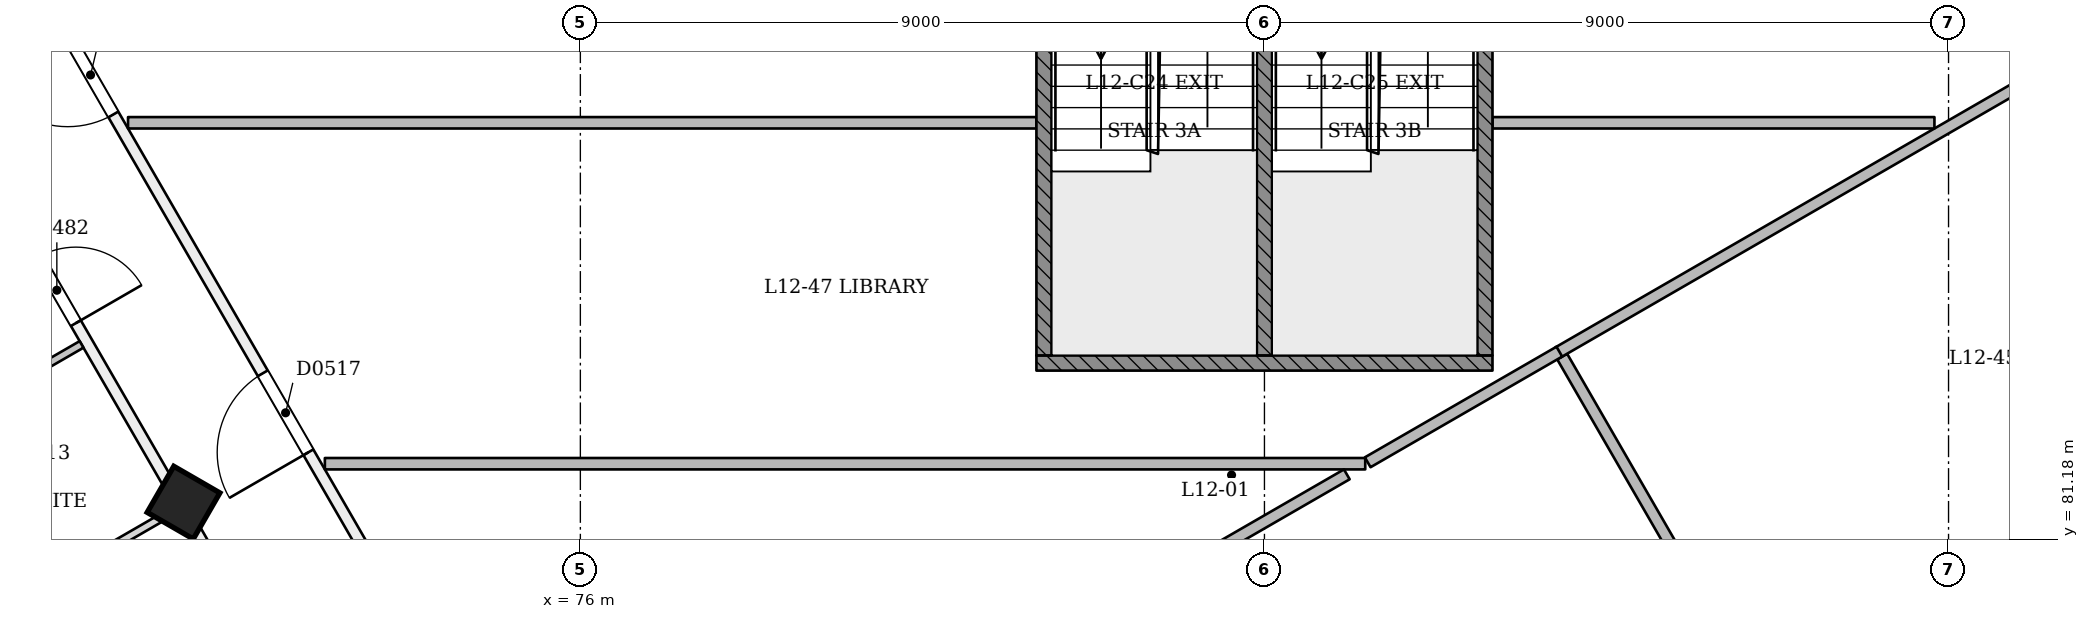
"""IFC4 building model, lengths in metres.
Left out: names, types, materials, properties, quantities, classifications, styles, units other than length and angle.
Written with IfcOpenShell. Run it as: python <this file> out.ifc"""

import sys

from ifc_helpers import new_model, si_unit, direction, frame, frame_2d, origin, origin_2d, place, context, subcontext, project, spatial, rectangle, extrude, element, fill, save


model = new_model("IFC4")
c1 = context("Model", 3, precision=1e-05, world=origin(), true_north=direction((0.0, 1.0)))
c2 = subcontext(c1, "Body", "Model", "MODEL_VIEW")
j1 = project(units=[si_unit("LENGTHUNIT", "METRE"), si_unit("PLANEANGLEUNIT", "RADIAN")], contexts=[c1])
p1 = place(None, origin())
s1 = spatial("IfcSite", under=j1, at=p1, CompositionType="ELEMENT")
p2 = place(p1, origin())
s2 = spatial("IfcBuilding", under=s1, at=p2, CompositionType="ELEMENT")
p3 = place(p2, frame((0.0, 0.0, 52.2)))
s3 = spatial("IfcBuildingStorey", under=s2, at=p3, CompositionType="ELEMENT", Elevation=52.2)
p4 = place(p3, frame((70.752, 81.616, -0.021), z_axis=(0.02215369191, 0.038413282303, 0.999016333038), x_axis=(-0.865362014197, -0.499673699336, 0.038402845936)))
e1 = element("IfcColumn", 1, at=p4, inside=s3, PredefinedType="COLUMN", context=c2, shape_type="SweptSolid", body=[
    extrude(rectangle(XDim=0.7, YDim=0.7, at=origin_2d()), origin(), (0.0, 0.0, 1.0), 3.604),
])
p5 = place(p3, frame((64.002, 93.308, 0.0), z_axis=(0.0, 0.0, 1.0), x_axis=(0.49999948646, -0.866025700277, 0.0)))
e2 = element("IfcWall", 2, at=p5, inside=s3, PredefinedType="PARTITIONING", context=c2, shape_type="SweptSolid", body=[
    extrude(rectangle(XDim=38.6, YDim=0.15, at=frame_2d((19.3, 0.0))), origin(), (0.0, 0.0, 1.0), 2.7),
])
p6 = place(p5, frame((0.605, 0.0, 0.0)))
e3 = element("IfcOpeningElement", 3, at=p6, cuts=e2, PredefinedType="OPENING", context=c2, shape_type="SweptSolid", body=[
    extrude(rectangle(XDim=1.0, YDim=2.1, at=frame_2d((0.5, 1.05))), frame((0.0, 0.085, 0.0), z_axis=(0.0, -1.0, 0.0), x_axis=(1.0, 0.0, 0.0)), (0.0, 0.0, 1.0), 0.171),
])
p7 = place(p5, frame((7.28, 0.0, 0.0)))
e4 = element("IfcOpeningElement", 4, at=p7, cuts=e2, PredefinedType="OPENING", context=c2, shape_type="SweptSolid", body=[
    extrude(rectangle(XDim=1.0, YDim=2.1, at=frame_2d((0.5, 1.05))), frame((0.0, 0.085, 0.0), z_axis=(0.0, -1.0, 0.0), x_axis=(1.0, 0.0, 0.0)), (0.0, 0.0, 1.0), 0.171),
])
p8 = place(p5, frame((9.72, 0.0, 0.0)))
e5 = element("IfcOpeningElement", 5, at=p8, cuts=e2, PredefinedType="OPENING", context=c2, shape_type="SweptSolid", body=[
    extrude(rectangle(XDim=1.0, YDim=2.1, at=frame_2d((0.5, 1.05))), frame((0.0, 0.085, 0.0), z_axis=(0.0, -1.0, 0.0), x_axis=(1.0, 0.0, 0.0)), (0.0, 0.0, 1.0), 0.171),
])
p9 = place(p5, frame((16.395, 0.0, 0.0)))
e6 = element("IfcOpeningElement", 6, at=p9, cuts=e2, PredefinedType="OPENING", context=c2, shape_type="SweptSolid", body=[
    extrude(rectangle(XDim=1.0, YDim=2.1, at=frame_2d((0.5, 1.05))), frame((0.0, 0.085, 0.0), z_axis=(0.0, -1.0, 0.0), x_axis=(1.0, 0.0, 0.0)), (0.0, 0.0, 1.0), 0.171),
])
p10 = place(p5, frame((18.72, 0.0, 0.0)))
e7 = element("IfcOpeningElement", 7, at=p10, cuts=e2, PredefinedType="OPENING", context=c2, shape_type="SweptSolid", body=[
    extrude(rectangle(XDim=1.0, YDim=2.1, at=frame_2d((0.5, 1.05))), frame((0.0, 0.085, 0.0), z_axis=(0.0, -1.0, 0.0), x_axis=(1.0, 0.0, 0.0)), (0.0, 0.0, 1.0), 0.171),
])
p11 = place(p5, frame((25.395, 0.0, 0.0)))
e8 = element("IfcOpeningElement", 8, at=p11, cuts=e2, PredefinedType="OPENING", context=c2, shape_type="SweptSolid", body=[
    extrude(rectangle(XDim=1.0, YDim=2.1, at=frame_2d((0.5, 1.05))), frame((0.0, 0.085, 0.0), z_axis=(0.0, -1.0, 0.0), x_axis=(1.0, 0.0, 0.0)), (0.0, 0.0, 1.0), 0.171),
])
p12 = place(p5, frame((27.605, 0.0, 0.0)))
e9 = element("IfcOpeningElement", 9, at=p12, cuts=e2, PredefinedType="OPENING", context=c2, shape_type="SweptSolid", body=[
    extrude(rectangle(XDim=1.0, YDim=2.1, at=frame_2d((0.5, 1.05))), frame((0.0, 0.085, 0.0), z_axis=(0.0, -1.0, 0.0), x_axis=(1.0, 0.0, 0.0)), (0.0, 0.0, 1.0), 0.171),
])
p13 = place(p5, frame((34.28, 0.0, 0.0)))
e10 = element("IfcOpeningElement", 10, at=p13, cuts=e2, PredefinedType="OPENING", context=c2, shape_type="SweptSolid", body=[
    extrude(rectangle(XDim=1.0, YDim=2.1, at=frame_2d((0.5, 1.05))), frame((0.0, 0.085, 0.0), z_axis=(0.0, -1.0, 0.0), x_axis=(1.0, 0.0, 0.0)), (0.0, 0.0, 1.0), 0.171),
])
p14 = place(p5, frame((37.324, 0.0, 0.0)))
e11 = element("IfcOpeningElement", 11, at=p14, cuts=e2, PredefinedType="OPENING", context=c2, shape_type="SweptSolid", body=[
    extrude(rectangle(XDim=1.0, YDim=2.1, at=frame_2d((0.5, 1.05))), frame((0.0, 0.085, 0.0), z_axis=(0.0, -1.0, 0.0), x_axis=(1.0, 0.0, 0.0)), (0.0, 0.0, 1.0), 0.171),
])
p15 = place(p3, frame((86.05, 58.757, 0.0), z_axis=(0.0, 0.0, 1.0), x_axis=(0.499999296855, 0.866025809745, 0.0)))
e12 = element("IfcWall", 12, at=p15, inside=s3, PredefinedType="PARTITIONING", context=c2, shape_type="SweptSolid", body=[
    extrude(rectangle(XDim=43.792, YDim=0.15, at=frame_2d((21.896, 0.0))), origin(), (0.0, 0.0, 1.0), 2.7),
])
p16 = place(p15, frame((3.598, 0.0, 0.0)))
e13 = element("IfcOpeningElement", 13, at=p16, cuts=e12, PredefinedType="OPENING", context=c2, shape_type="SweptSolid", body=[
    extrude(rectangle(XDim=1.2, YDim=2.1, at=frame_2d((0.6, 1.05))), frame((0.0, 0.085, 0.0), z_axis=(0.0, -1.0, 0.0), x_axis=(1.0, 0.0, 0.0)), (0.0, 0.0, 1.0), 0.171),
])
p17 = place(p15, frame((11.176, 0.0, 0.0)))
e14 = element("IfcOpeningElement", 14, at=p17, cuts=e12, PredefinedType="OPENING", context=c2, shape_type="SweptSolid", body=[
    extrude(rectangle(XDim=1.0, YDim=2.1, at=frame_2d((0.5, 1.05))), frame((0.0, 0.085, 0.0), z_axis=(0.0, -1.0, 0.0), x_axis=(1.0, 0.0, 0.0)), (0.0, 0.0, 1.0), 0.171),
])
p18 = place(p15, frame((13.616, 0.0, 0.0)))
e15 = element("IfcOpeningElement", 15, at=p18, cuts=e12, PredefinedType="OPENING", context=c2, shape_type="SweptSolid", body=[
    extrude(rectangle(XDim=1.0, YDim=2.1, at=frame_2d((0.5, 1.05))), frame((0.0, 0.085, 0.0), z_axis=(0.0, -1.0, 0.0), x_axis=(1.0, 0.0, 0.0)), (0.0, 0.0, 1.0), 0.171),
])
p19 = place(p15, frame((20.176, 0.0, 0.0)))
e16 = element("IfcOpeningElement", 16, at=p19, cuts=e12, PredefinedType="OPENING", context=c2, shape_type="SweptSolid", body=[
    extrude(rectangle(XDim=1.0, YDim=2.1, at=frame_2d((0.5, 1.05))), frame((0.0, 0.085, 0.0), z_axis=(0.0, -1.0, 0.0), x_axis=(1.0, 0.0, 0.0)), (0.0, 0.0, 1.0), 0.171),
])
p20 = place(p15, frame((22.616, 0.0, 0.0)))
e17 = element("IfcOpeningElement", 17, at=p20, cuts=e12, PredefinedType="OPENING", context=c2, shape_type="SweptSolid", body=[
    extrude(rectangle(XDim=1.0, YDim=2.1, at=frame_2d((0.5, 1.05))), frame((0.0, 0.085, 0.0), z_axis=(0.0, -1.0, 0.0), x_axis=(1.0, 0.0, 0.0)), (0.0, 0.0, 1.0), 0.171),
])
p21 = place(p15, frame((29.176, 0.0, 0.0)))
e18 = element("IfcOpeningElement", 18, at=p21, cuts=e12, PredefinedType="OPENING", context=c2, shape_type="SweptSolid", body=[
    extrude(rectangle(XDim=1.0, YDim=2.1, at=frame_2d((0.5, 1.05))), frame((0.0, 0.085, 0.0), z_axis=(0.0, -1.0, 0.0), x_axis=(1.0, 0.0, 0.0)), (0.0, 0.0, 1.0), 0.171),
])
p22 = place(p15, frame((31.616, 0.0, 0.0)))
e19 = element("IfcOpeningElement", 19, at=p22, cuts=e12, PredefinedType="OPENING", context=c2, shape_type="SweptSolid", body=[
    extrude(rectangle(XDim=1.0, YDim=2.1, at=frame_2d((0.5, 1.05))), frame((0.0, 0.085, 0.0), z_axis=(0.0, -1.0, 0.0), x_axis=(1.0, 0.0, 0.0)), (0.0, 0.0, 1.0), 0.171),
])
p23 = place(p15, frame((38.176, 0.0, 0.0)))
e20 = element("IfcOpeningElement", 20, at=p23, cuts=e12, PredefinedType="OPENING", context=c2, shape_type="SweptSolid", body=[
    extrude(rectangle(XDim=1.0, YDim=2.1, at=frame_2d((0.5, 1.05))), frame((0.0, 0.085, 0.0), z_axis=(0.0, -1.0, 0.0), x_axis=(1.0, 0.0, 0.0)), (0.0, 0.0, 1.0), 0.171),
])
p24 = place(p15, frame((41.344, 0.0, 0.0)))
e21 = element("IfcOpeningElement", 21, at=p24, cuts=e12, PredefinedType="OPENING", context=c2, shape_type="SweptSolid", body=[
    extrude(rectangle(XDim=1.0, YDim=2.1, at=frame_2d((0.5, 1.05))), frame((0.0, 0.085, 0.0), z_axis=(0.0, -1.0, 0.0), x_axis=(1.0, 0.0, 0.0)), (0.0, 0.0, 1.0), 0.171),
])
p25 = place(p3, frame((85.0, 60.54, 0.0), z_axis=(0.0, 0.0, 1.0), x_axis=(-0.500000084694, 0.866025354886, 0.0)))
e22 = element("IfcWall", 22, at=p25, inside=s3, PredefinedType="PARTITIONING", context=c2, shape_type="SweptSolid", body=[
    extrude(rectangle(XDim=34.711, YDim=0.15, at=frame_2d((17.355, 0.0))), origin(), (0.0, 0.0, 1.0), 3.1),
])
p26 = place(p25, frame((5.966, 0.0, 0.0)))
e23 = element("IfcOpeningElement", 23, at=p26, cuts=e22, PredefinedType="OPENING", context=c2, shape_type="SweptSolid", body=[
    extrude(rectangle(XDim=1.2, YDim=2.1, at=frame_2d((0.6, 1.05))), frame((0.0, 0.085, 0.0), z_axis=(0.0, -1.0, 0.0), x_axis=(1.0, 0.0, 0.0)), (0.0, 0.0, 1.0), 0.171),
])
p27 = place(p25, frame((11.813, 0.0, 0.0)))
e24 = element("IfcOpeningElement", 24, at=p27, cuts=e22, PredefinedType="OPENING", context=c2, shape_type="SweptSolid", body=[
    extrude(rectangle(XDim=1.2, YDim=2.1, at=frame_2d((0.6, 1.05))), frame((0.0, 0.085, 0.0), z_axis=(0.0, -1.0, 0.0), x_axis=(1.0, 0.0, 0.0)), (0.0, 0.0, 1.0), 0.171),
])
p28 = place(p25, frame((25.156, 0.0, 0.0)))
e25 = element("IfcOpeningElement", 25, at=p28, cuts=e22, PredefinedType="OPENING", context=c2, shape_type="SweptSolid", body=[
    extrude(rectangle(XDim=1.2, YDim=2.1, at=frame_2d((0.6, 1.05))), frame((0.0, 0.085, 0.0), z_axis=(0.0, -1.0, 0.0), x_axis=(1.0, 0.0, 0.0)), (0.0, 0.0, 1.0), 0.171),
])
p29 = place(p25, frame((30.288, 0.0, 0.0)))
e26 = element("IfcOpeningElement", 26, at=p29, cuts=e22, PredefinedType="OPENING", context=c2, shape_type="SweptSolid", body=[
    extrude(rectangle(XDim=1.2, YDim=2.1, at=frame_2d((0.6, 1.05))), frame((0.0, 0.085, 0.0), z_axis=(0.0, -1.0, 0.0), x_axis=(1.0, 0.0, 0.0)), (0.0, 0.0, 1.0), 0.171),
])
p30 = place(p25, frame((15.887, 0.0, 0.0)))
e27 = element("IfcOpeningElement", 27, at=p30, cuts=e22, PredefinedType="OPENING", context=c2, shape_type="SweptSolid", body=[
    extrude(rectangle(XDim=1.2, YDim=2.1, at=frame_2d((0.6, 1.05))), frame((0.0, 0.085, 0.0), z_axis=(0.0, -1.0, 0.0), x_axis=(1.0, 0.0, 0.0)), (0.0, 0.0, 1.0), 0.171),
])
p31 = place(p25, frame((19.777, 0.0, 0.0)))
e28 = element("IfcOpeningElement", 28, at=p31, cuts=e22, PredefinedType="OPENING", context=c2, shape_type="SweptSolid", body=[
    extrude(rectangle(XDim=1.2, YDim=2.1, at=frame_2d((0.6, 1.05))), frame((0.0, 0.085, 0.0), z_axis=(0.0, -1.0, 0.0), x_axis=(1.0, 0.0, 0.0)), (0.0, 0.0, 1.0), 0.171),
])
p32 = place(p3, frame((102.355, 90.6, 0.0), z_axis=(0.0, 0.0, 1.0), x_axis=(-0.500000924128, -0.866024870238, 0.0)))
e29 = element("IfcWall", 29, at=p32, inside=s3, PredefinedType="PARTITIONING", context=c2, shape_type="SweptSolid", body=[
    extrude(rectangle(XDim=34.581, YDim=0.15, at=frame_2d((17.291, 0.0))), origin(), (0.0, 0.0, 1.0), 3.1),
])
p33 = place(p32, frame((9.118, 0.0, 0.0)))
e30 = element("IfcOpeningElement", 30, at=p33, cuts=e29, PredefinedType="OPENING", context=c2, shape_type="SweptSolid", body=[
    extrude(rectangle(XDim=1.2, YDim=2.1, at=frame_2d((0.6, 1.05))), frame((0.0, 0.085, 0.0), z_axis=(0.0, -1.0, 0.0), x_axis=(1.0, 0.0, 0.0)), (0.0, 0.0, 1.0), 0.171),
])
p34 = place(p3, frame((66.991, 82.332, 0.0), z_axis=(0.0, 0.0, 1.0), x_axis=(0.866048868473, 0.499959355765, 0.0)))
e31 = element("IfcWall", 31, at=p34, inside=s3, PredefinedType="PARTITIONING", context=c2, shape_type="SweptSolid", body=[
    extrude(rectangle(XDim=2.825, YDim=0.1, at=frame_2d((1.413, 0.0))), origin(), (0.0, 0.0, 1.0), 3.1),
])
p35 = place(p34, frame((1.0, 0.0, 0.0)))
e32 = element("IfcOpeningElement", 32, at=p35, cuts=e31, PredefinedType="OPENING", context=c2, shape_type="SweptSolid", body=[
    extrude(rectangle(XDim=0.9, YDim=2.1, at=frame_2d((0.45, 1.05))), frame((0.0, 0.061, 0.0), z_axis=(0.0, -1.0, 0.0), x_axis=(1.0, 0.0, 0.0)), (0.0, 0.0, 1.0), 0.121),
])
p36 = place(p3, frame((68.224, 80.157, 0.0), z_axis=(0.0, 0.0, 1.0), x_axis=(0.866026948466, 0.499997324523, 0.0)))
e33 = element("IfcWall", 33, at=p36, inside=s3, PredefinedType="PARTITIONING", context=c2, shape_type="SweptSolid", body=[
    extrude(rectangle(XDim=2.845, YDim=0.1, at=frame_2d((1.422, 0.0))), origin(), (0.0, 0.0, 1.0), 2.7),
])
p37 = place(p3, frame((88.917, 83.584, 0.0), z_axis=(0.0, 0.0, 1.0), x_axis=(0.499986679841, -0.866033094045, 0.0)))
e34 = element("IfcWall", 34, at=p37, inside=s3, PredefinedType="PARTITIONING", context=c2, shape_type="SweptSolid", body=[
    extrude(rectangle(XDim=7.998, YDim=0.15, at=frame_2d((3.999, 0.0))), origin(), (0.0, 0.0, 1.0), 3.1),
])
p38 = place(p3, frame((100.676, 90.46, 0.0), z_axis=(0.0, 0.0, 1.0), x_axis=(-0.866019571687, -0.500010101354, 0.0)))
e35 = element("IfcWall", 35, at=p38, inside=s3, PredefinedType="PARTITIONING", context=c2, shape_type="SweptSolid", body=[
    extrude(rectangle(XDim=13.641, YDim=0.15, at=frame_2d((6.82, 0.0))), origin(), (0.0, 0.0, 1.0), 3.1),
])
p39 = place(p3, frame((82.0, 86.66, 0.0), z_axis=(0.0, 0.0, 1.0), x_axis=(-1.0, 0.0, 0.0)))
e36 = element("IfcWall", 36, at=p39, inside=s3, PredefinedType="PARTITIONING", context=c2, shape_type="SweptSolid", body=[
    extrude(rectangle(XDim=11.951, YDim=0.15, at=frame_2d((5.976, 0.0))), origin(), (0.0, 0.0, 1.0), 3.1),
])
p40 = place(p3, frame((86.358, 82.194, 0.0), z_axis=(0.0, 0.0, 1.0), x_axis=(0.86603616059, 0.499981368203, 0.0)))
e37 = element("IfcWall", 37, at=p40, inside=s3, PredefinedType="PARTITIONING", context=c2, shape_type="SweptSolid", body=[
    extrude(rectangle(XDim=2.911, YDim=0.15, at=frame_2d((1.456, 0.0))), origin(), (0.0, 0.0, 1.0), 3.1),
])
p41 = place(p3, frame((72.639, 82.175, 0.0), z_axis=(0.0, 0.0, 1.0), x_axis=(1.0, 0.0, 0.0)))
e38 = element("IfcWall", 38, at=p41, inside=s3, PredefinedType="PARTITIONING", context=c2, shape_type="SweptSolid", body=[
    extrude(rectangle(XDim=13.687, YDim=0.15, at=frame_2d((6.844, 0.0))), origin(), (0.0, 0.0, 1.0), 3.1),
])
p42 = place(p3, frame((93.814, 86.66, 0.0), z_axis=(0.0, 0.0, 1.0), x_axis=(-1.0, 0.0, 0.0)))
e39 = element("IfcWall", 39, at=p42, inside=s3, PredefinedType="PARTITIONING", context=c2, shape_type="SweptSolid", body=[
    extrude(rectangle(XDim=5.814, YDim=0.15, at=frame_2d((2.907, 0.0))), origin(), (0.0, 0.0, 1.0), 3.1),
])
p43 = place(p3, frame((86.083, 82.035, 0.0), z_axis=(0.0, 0.0, 1.0), x_axis=(-0.866028367734, -0.499994866253, 0.0)))
e40 = element("IfcWall", 40, at=p43, inside=s3, PredefinedType="PARTITIONING", context=c2, shape_type="SweptSolid", body=[
    extrude(rectangle(XDim=11.611, YDim=0.15, at=frame_2d((5.805, 0.0))), origin(), (0.0, 0.0, 1.0), 3.1),
])
p44 = place(p3, frame((82.0, 83.5, 0.0), z_axis=(0.0, 0.0, 1.0), x_axis=(1.0, 0.0, 0.0)))
e41 = element("IfcWall", 41, at=p44, inside=s3, PredefinedType="SOLIDWALL", context=c2, shape_type="SweptSolid", body=[
    extrude(rectangle(XDim=6.0, YDim=0.2, at=frame_2d((3.0, 0.0))), origin(), (0.0, 0.0, 1.0), 3.1),
])
for number, where, z_axis, x_axis in (
    (42, (82.1, 83.6, 0.0), (0.0, 0.0, 1.0), (0.0, 1.0, 0.0)),
    (43, (87.9, 83.6, 0.0), (0.0, 0.0, 1.0), (0.0, 1.0, 0.0)),
    (44, (85.0, 83.6, 0.0), (0.0, 0.0, 1.0), (0.0, 1.0, 0.0)),
):
    element("IfcWall", number, at=place(p3, frame(where, z_axis=z_axis, x_axis=x_axis)), inside=s3, PredefinedType="SOLIDWALL", context=c2, shape_type="SweptSolid", body=[
        extrude(rectangle(XDim=6.8, YDim=0.2, at=frame_2d((3.4, 0.0))), origin(), (0.0, 0.0, 1.0), 3.1),
    ])
p45 = place(p8, origin())
e45 = element("IfcDoor", 45, at=p45, inside=s3, OperationType="SINGLE_SWING_RIGHT", PredefinedType="NOTDEFINED", context=c2, shape_type="SweptSolid", body=[
    extrude(rectangle(XDim=1.0, YDim=2.1, at=frame_2d((0.5, 1.05))), frame((0.0, 0.025, 0.0), z_axis=(0.0, -1.0, 0.0), x_axis=(1.0, 0.0, 0.0)), (0.0, 0.0, 1.0), 0.05),
])
fill(e5, e45)
p46 = place(p28, origin())
e46 = element("IfcDoor", 46, at=p46, inside=s3, OperationType="SINGLE_SWING_LEFT", PredefinedType="NOTDEFINED", context=c2, shape_type="SweptSolid", body=[
    extrude(rectangle(XDim=1.2, YDim=2.1, at=frame_2d((0.6, 1.05))), frame((0.0, 0.025, 0.0), z_axis=(0.0, -1.0, 0.0), x_axis=(1.0, 0.0, 0.0)), (0.0, 0.0, 1.0), 0.05),
])
fill(e25, e46)
p47 = place(p29, origin())
e47 = element("IfcDoor", 47, at=p47, inside=s3, OperationType="SINGLE_SWING_RIGHT", PredefinedType="NOTDEFINED", context=c2, shape_type="SweptSolid", body=[
    extrude(rectangle(XDim=1.2, YDim=2.1, at=frame_2d((0.6, 1.05))), frame((0.0, 0.025, 0.0), z_axis=(0.0, -1.0, 0.0), x_axis=(1.0, 0.0, 0.0)), (0.0, 0.0, 1.0), 0.05),
])
fill(e26, e47)
save(model, sys.argv[1])
